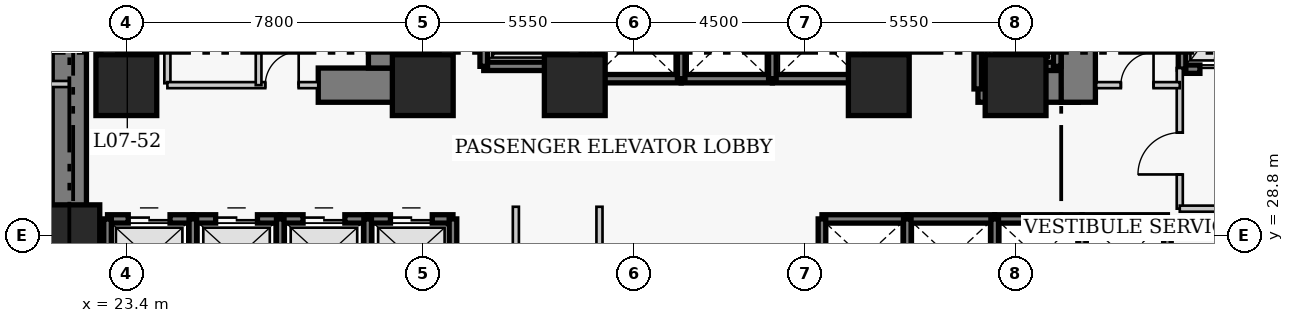
"""IFC4 building model, lengths in metres.
Left out: names, types, materials, properties, quantities, classifications, styles, units other than length and angle.
Written with IfcOpenShell. Run it as: python <this file> out.ifc"""

import sys

from ifc_helpers import new_model, si_unit, direction, frame, frame_2d, origin, origin_2d, place, context, subcontext, project, spatial, rectangle, extrude, element, fill, save


model = new_model("IFC4")
c1 = context("Model", 3, precision=1e-05, world=origin(), true_north=direction((0.0, 1.0)))
c2 = subcontext(c1, "Body", "Model", "MODEL_VIEW")
j1 = project(units=[si_unit("LENGTHUNIT", "METRE"), si_unit("PLANEANGLEUNIT", "RADIAN")], contexts=[c1])
p1 = place(None, origin())
s1 = spatial("IfcSite", under=j1, at=p1, CompositionType="ELEMENT")
p2 = place(p1, origin())
s2 = spatial("IfcBuilding", under=s1, at=p2, CompositionType="ELEMENT")
p3 = place(p2, frame((0.0, 0.0, 33.6)))
s3 = spatial("IfcBuildingStorey", under=s2, at=p3, CompositionType="ELEMENT", Elevation=33.6)
p4 = place(p3, frame((21.9, 27.05, 0.0), z_axis=(0.0, 0.0, 1.0), x_axis=(0.0, 1.0, 0.0)))
e1 = element("IfcWall", 1, at=p4, inside=s3, PredefinedType="SHEAR", context=c2, shape_type="SweptSolid", body=[
    extrude(rectangle(XDim=13.72, YDim=0.9, at=frame_2d((6.86, 0.0))), origin(), (0.0, 0.0, 1.0), 3.8),
])
p5 = place(p3, frame((28.45, 32.75, 0.0), z_axis=(0.0, 0.0, 1.0), x_axis=(1.0, 0.0, 0.0)))
e2 = element("IfcWall", 2, at=p5, inside=s3, PredefinedType="SHEAR", context=c2, shape_type="SweptSolid", body=[
    extrude(rectangle(XDim=2.4, YDim=0.9, at=frame_2d((1.2, 0.0))), origin(), (0.0, 0.0, 1.0), 3.8),
])
p6 = place(p3, frame((45.81, 32.75, 0.0), z_axis=(0.0, 0.0, 1.0), x_axis=(1.0, 0.0, 0.0)))
e3 = element("IfcWall", 3, at=p6, inside=s3, PredefinedType="SHEAR", context=c2, shape_type="SweptSolid", body=[
    extrude(rectangle(XDim=2.64, YDim=0.9, at=frame_2d((1.32, 0.0))), origin(), (0.0, 0.0, 1.0), 3.8),
])
p7 = place(p3, frame((30.22, 33.2, 0.0), z_axis=(0.0, 0.0, 1.0), x_axis=(0.0, 1.0, 0.0)))
e4 = element("IfcWall", 4, at=p7, inside=s3, PredefinedType="SHEAR", context=c2, shape_type="SweptSolid", body=[
    extrude(rectangle(XDim=7.12, YDim=0.9, at=frame_2d((3.56, 0.0))), origin(), (0.0, 0.0, 1.0), 3.8),
])
p8 = place(p3, frame((48.45, 32.3, 0.0), z_axis=(0.0, 0.0, 1.0), x_axis=(0.0, 1.0, 0.0)))
e5 = element("IfcWall", 5, at=p8, inside=s3, PredefinedType="SHEAR", context=c2, shape_type="SweptSolid", body=[
    extrude(rectangle(XDim=8.02, YDim=0.9, at=frame_2d((4.01, 0.0))), origin(), (0.0, 0.0, 1.0), 3.8),
])
p9 = place(p8, frame((5.9, 0.0, 0.0)))
e6 = element("IfcOpeningElement", 6, at=p9, cuts=e5, PredefinedType="OPENING", context=c2, shape_type="SweptSolid", body=[
    extrude(rectangle(XDim=1.1, YDim=2.15, at=frame_2d((0.55, 1.075))), frame((0.0, 0.46, 0.0), z_axis=(0.0, -1.0, 0.0), x_axis=(1.0, 0.0, 0.0)), (0.0, 0.0, 1.0), 0.92),
])
for number, where, z_axis, x_axis in (
    (7, (21.9, 28.8, 0.0), (0.0, 0.0, 1.0), (1.0, 0.0, 0.0)),
    (8, (23.4, 32.75, 0.0), (0.0, 0.0, 1.0), (1.0, 0.0, 0.0)),
    (9, (31.2, 32.75, 0.0), (0.0, 0.0, 1.0), (1.0, 0.0, 0.0)),
    (10, (35.2, 32.75, 0.0), (0.0, 0.0, 1.0), (1.0, 0.0, 0.0)),
    (11, (43.2, 32.75, 0.0), (0.0, 0.0, 1.0), (1.0, 0.0, 0.0)),
    (12, (46.8, 32.75, 0.0), (0.0, 0.0, 1.0), (1.0, 0.0, 0.0)),
):
    element("IfcColumn", number, at=place(p3, frame(where, z_axis=z_axis, x_axis=x_axis)), inside=s3, PredefinedType="COLUMN", context=c2, shape_type="SweptSolid", body=[
        extrude(rectangle(XDim=1.6, YDim=1.6, at=origin_2d()), origin(), (0.0, 0.0, 1.0), 3.8),
    ])
p10 = place(p3, frame((22.905, 29.23, 0.0), z_axis=(0.0, 0.0, 1.0), x_axis=(1.0, 0.0, 0.0)))
e13 = element("IfcWall", 13, at=p10, inside=s3, PredefinedType="SHEAR", context=c2, shape_type="SweptSolid", body=[
    extrude(rectangle(XDim=2.245, YDim=0.22, at=frame_2d((1.123, 0.0))), origin(), (0.0, 0.0, 1.0), 3.8),
])
p11 = place(p10, frame((0.545, 0.0, 0.0)))
e14 = element("IfcOpeningElement", 14, at=p11, cuts=e13, PredefinedType="OPENING", context=c2, shape_type="SweptSolid", body=[
    extrude(rectangle(XDim=1.1, YDim=2.15, at=frame_2d((0.55, 1.075))), frame((0.0, 0.12, 0.0), z_axis=(0.0, -1.0, 0.0), x_axis=(1.0, 0.0, 0.0)), (0.0, 0.0, 1.0), 0.24),
])
p12 = place(p3, frame((22.905, 27.17, 0.0), z_axis=(0.0, 0.0, 1.0), x_axis=(0.0, 1.0, 0.0)))
e15 = element("IfcWall", 15, at=p12, inside=s3, PredefinedType="SHEAR", context=c2, shape_type="SweptSolid", body=[
    extrude(rectangle(XDim=2.06, YDim=0.2, at=frame_2d((1.03, 0.0))), origin(), (0.0, 0.0, 1.0), 3.8),
])
p13 = place(p3, frame((25.15, 29.23, 0.0), z_axis=(0.0, 0.0, 1.0), x_axis=(1.0, 0.0, 0.0)))
e16 = element("IfcWall", 16, at=p13, inside=s3, PredefinedType="SHEAR", context=c2, shape_type="SweptSolid", body=[
    extrude(rectangle(XDim=2.3, YDim=0.22, at=frame_2d((1.15, 0.0))), origin(), (0.0, 0.0, 1.0), 3.8),
])
p14 = place(p13, frame((0.6, 0.0, 0.0)))
e17 = element("IfcOpeningElement", 17, at=p14, cuts=e16, PredefinedType="OPENING", context=c2, shape_type="SweptSolid", body=[
    extrude(rectangle(XDim=1.1, YDim=2.15, at=frame_2d((0.55, 1.075))), frame((0.0, 0.12, 0.0), z_axis=(0.0, -1.0, 0.0), x_axis=(1.0, 0.0, 0.0)), (0.0, 0.0, 1.0), 0.24),
])
p15 = place(p3, frame((25.15, 27.17, 0.0), z_axis=(0.0, 0.0, 1.0), x_axis=(0.0, 1.0, 0.0)))
e18 = element("IfcWall", 18, at=p15, inside=s3, PredefinedType="SHEAR", context=c2, shape_type="SweptSolid", body=[
    extrude(rectangle(XDim=2.06, YDim=0.2, at=frame_2d((1.03, 0.0))), origin(), (0.0, 0.0, 1.0), 3.8),
])
p16 = place(p3, frame((27.45, 29.23, 0.0), z_axis=(0.0, 0.0, 1.0), x_axis=(1.0, 0.0, 0.0)))
e19 = element("IfcWall", 19, at=p16, inside=s3, PredefinedType="SHEAR", context=c2, shape_type="SweptSolid", body=[
    extrude(rectangle(XDim=2.3, YDim=0.22, at=frame_2d((1.15, 0.0))), origin(), (0.0, 0.0, 1.0), 3.8),
])
p17 = place(p16, frame((0.6, 0.0, 0.0)))
e20 = element("IfcOpeningElement", 20, at=p17, cuts=e19, PredefinedType="OPENING", context=c2, shape_type="SweptSolid", body=[
    extrude(rectangle(XDim=1.1, YDim=2.15, at=frame_2d((0.55, 1.075))), frame((0.0, 0.12, 0.0), z_axis=(0.0, -1.0, 0.0), x_axis=(1.0, 0.0, 0.0)), (0.0, 0.0, 1.0), 0.24),
])
p18 = place(p3, frame((27.45, 27.17, 0.0), z_axis=(0.0, 0.0, 1.0), x_axis=(0.0, 1.0, 0.0)))
e21 = element("IfcWall", 21, at=p18, inside=s3, PredefinedType="SHEAR", context=c2, shape_type="SweptSolid", body=[
    extrude(rectangle(XDim=2.06, YDim=0.2, at=frame_2d((1.03, 0.0))), origin(), (0.0, 0.0, 1.0), 3.8),
])
p19 = place(p3, frame((29.75, 29.23, 0.0), z_axis=(0.0, 0.0, 1.0), x_axis=(1.0, 0.0, 0.0)))
e22 = element("IfcWall", 22, at=p19, inside=s3, PredefinedType="SHEAR", context=c2, shape_type="SweptSolid", body=[
    extrude(rectangle(XDim=2.245, YDim=0.22, at=frame_2d((1.123, 0.0))), origin(), (0.0, 0.0, 1.0), 3.8),
])
p20 = place(p19, frame((0.6, 0.0, 0.0)))
e23 = element("IfcOpeningElement", 23, at=p20, cuts=e22, PredefinedType="OPENING", context=c2, shape_type="SweptSolid", body=[
    extrude(rectangle(XDim=1.1, YDim=2.15, at=frame_2d((0.55, 1.075))), frame((0.0, 0.12, 0.0), z_axis=(0.0, -1.0, 0.0), x_axis=(1.0, 0.0, 0.0)), (0.0, 0.0, 1.0), 0.24),
])
for number, where, z_axis, x_axis in (
    (24, (29.75, 27.17, 0.0), (0.0, 0.0, 1.0), (0.0, 1.0, 0.0)),
    (25, (31.995, 27.17, 0.0), (0.0, 0.0, 1.0), (0.0, 1.0, 0.0)),
):
    element("IfcWall", number, at=place(p3, frame(where, z_axis=z_axis, x_axis=x_axis)), inside=s3, PredefinedType="SHEAR", context=c2, shape_type="SweptSolid", body=[
        extrude(rectangle(XDim=2.06, YDim=0.2, at=frame_2d((1.03, 0.0))), origin(), (0.0, 0.0, 1.0), 3.8),
    ])
p21 = place(p3, frame((41.705, 29.23, 0.0), z_axis=(0.0, 0.0, 1.0), x_axis=(1.0, 0.0, 0.0)))
e26 = element("IfcWall", 26, at=p21, inside=s3, PredefinedType="SHEAR", context=c2, shape_type="SweptSolid", body=[
    extrude(rectangle(XDim=2.245, YDim=0.22, at=frame_2d((1.123, 0.0))), origin(), (0.0, 0.0, 1.0), 3.8),
])
p22 = place(p3, frame((41.705, 27.17, 0.0), z_axis=(0.0, 0.0, 1.0), x_axis=(0.0, 1.0, 0.0)))
e27 = element("IfcWall", 27, at=p22, inside=s3, PredefinedType="SHEAR", context=c2, shape_type="SweptSolid", body=[
    extrude(rectangle(XDim=2.06, YDim=0.2, at=frame_2d((1.03, 0.0))), origin(), (0.0, 0.0, 1.0), 3.8),
])
p23 = place(p3, frame((43.95, 29.23, 0.0), z_axis=(0.0, 0.0, 1.0), x_axis=(1.0, 0.0, 0.0)))
e28 = element("IfcWall", 28, at=p23, inside=s3, PredefinedType="SHEAR", context=c2, shape_type="SweptSolid", body=[
    extrude(rectangle(XDim=2.3, YDim=0.22, at=frame_2d((1.15, 0.0))), origin(), (0.0, 0.0, 1.0), 3.8),
])
p24 = place(p3, frame((43.95, 27.17, 0.0), z_axis=(0.0, 0.0, 1.0), x_axis=(0.0, 1.0, 0.0)))
e29 = element("IfcWall", 29, at=p24, inside=s3, PredefinedType="SHEAR", context=c2, shape_type="SweptSolid", body=[
    extrude(rectangle(XDim=2.06, YDim=0.2, at=frame_2d((1.03, 0.0))), origin(), (0.0, 0.0, 1.0), 3.8),
])
p25 = place(p3, frame((46.25, 29.23, 0.0), z_axis=(0.0, 0.0, 1.0), x_axis=(1.0, 0.0, 0.0)))
e30 = element("IfcWall", 30, at=p25, inside=s3, PredefinedType="SHEAR", context=c2, shape_type="SweptSolid", body=[
    extrude(rectangle(XDim=2.3, YDim=0.22, at=frame_2d((1.15, 0.0))), origin(), (0.0, 0.0, 1.0), 3.8),
])
p26 = place(p3, frame((46.25, 27.17, 0.0), z_axis=(0.0, 0.0, 1.0), x_axis=(0.0, 1.0, 0.0)))
e31 = element("IfcWall", 31, at=p26, inside=s3, PredefinedType="SHEAR", context=c2, shape_type="SweptSolid", body=[
    extrude(rectangle(XDim=2.06, YDim=0.2, at=frame_2d((1.03, 0.0))), origin(), (0.0, 0.0, 1.0), 3.8),
])
p27 = place(p3, frame((48.55, 29.23, 0.0), z_axis=(0.0, 0.0, 1.0), x_axis=(1.0, 0.0, 0.0)))
e32 = element("IfcWall", 32, at=p27, inside=s3, PredefinedType="SHEAR", context=c2, shape_type="SweptSolid", body=[
    extrude(rectangle(XDim=2.245, YDim=0.22, at=frame_2d((1.123, 0.0))), origin(), (0.0, 0.0, 1.0), 3.8),
])
for number, where, z_axis, x_axis in (
    (33, (48.55, 27.17, 0.0), (0.0, 0.0, 1.0), (0.0, 1.0, 0.0)),
    (34, (50.795, 27.17, 0.0), (0.0, 0.0, 1.0), (0.0, 1.0, 0.0)),
):
    element("IfcWall", number, at=place(p3, frame(where, z_axis=z_axis, x_axis=x_axis)), inside=s3, PredefinedType="SHEAR", context=c2, shape_type="SweptSolid", body=[
        extrude(rectangle(XDim=2.06, YDim=0.2, at=frame_2d((1.03, 0.0))), origin(), (0.0, 0.0, 1.0), 3.8),
    ])
p28 = place(p3, frame((35.68, 32.92, 0.0), z_axis=(0.0, 0.0, 1.0), x_axis=(1.0, 0.0, 0.0)))
e35 = element("IfcWall", 35, at=p28, inside=s3, PredefinedType="SHEAR", context=c2, shape_type="SweptSolid", body=[
    extrude(rectangle(XDim=2.32, YDim=0.22, at=frame_2d((1.16, 0.0))), origin(), (0.0, 0.0, 1.0), 3.8),
])
p29 = place(p3, frame((35.68, 32.92, 0.0), z_axis=(0.0, 0.0, 1.0), x_axis=(0.0, 1.0, 0.0)))
e36 = element("IfcWall", 36, at=p29, inside=s3, PredefinedType="SHEAR", context=c2, shape_type="SweptSolid", body=[
    extrude(rectangle(XDim=2.16, YDim=0.2, at=frame_2d((1.08, 0.0))), origin(), (0.0, 0.0, 1.0), 3.8),
])
p30 = place(p3, frame((38.0, 32.92, 0.0), z_axis=(0.0, 0.0, 1.0), x_axis=(1.0, 0.0, 0.0)))
e37 = element("IfcWall", 37, at=p30, inside=s3, PredefinedType="SHEAR", context=c2, shape_type="SweptSolid", body=[
    extrude(rectangle(XDim=2.4, YDim=0.22, at=frame_2d((1.2, 0.0))), origin(), (0.0, 0.0, 1.0), 3.8),
])
p31 = place(p3, frame((38.0, 32.92, 0.0), z_axis=(0.0, 0.0, 1.0), x_axis=(0.0, 1.0, 0.0)))
e38 = element("IfcWall", 38, at=p31, inside=s3, PredefinedType="SHEAR", context=c2, shape_type="SweptSolid", body=[
    extrude(rectangle(XDim=2.16, YDim=0.2, at=frame_2d((1.08, 0.0))), origin(), (0.0, 0.0, 1.0), 3.8),
])
p32 = place(p3, frame((40.4, 32.92, 0.0), z_axis=(0.0, 0.0, 1.0), x_axis=(1.0, 0.0, 0.0)))
e39 = element("IfcWall", 39, at=p32, inside=s3, PredefinedType="SHEAR", context=c2, shape_type="SweptSolid", body=[
    extrude(rectangle(XDim=2.32, YDim=0.22, at=frame_2d((1.16, 0.0))), origin(), (0.0, 0.0, 1.0), 3.8),
])
for number, where, z_axis, x_axis in (
    (40, (40.4, 32.92, 0.0), (0.0, 0.0, 1.0), (0.0, 1.0, 0.0)),
    (41, (42.72, 32.92, 0.0), (0.0, 0.0, 1.0), (0.0, 1.0, 0.0)),
):
    element("IfcWall", number, at=place(p3, frame(where, z_axis=z_axis, x_axis=x_axis)), inside=s3, PredefinedType="SHEAR", context=c2, shape_type="SweptSolid", body=[
        extrude(rectangle(XDim=2.16, YDim=0.2, at=frame_2d((1.08, 0.0))), origin(), (0.0, 0.0, 1.0), 3.8),
    ])
p33 = place(p3, frame((51.18, 33.17, 0.0), z_axis=(0.0, 0.0, 1.0), x_axis=(1.0, 0.0, 0.0)))
e42 = element("IfcWall", 42, at=p33, inside=s3, PredefinedType="SHEAR", context=c2, shape_type="SweptSolid", body=[
    extrude(rectangle(XDim=2.42, YDim=0.22, at=frame_2d((1.21, 0.0))), origin(), (0.0, 0.0, 1.0), 3.8),
])
p34 = place(p33, frame((0.47, 0.0, 0.0)))
e43 = element("IfcOpeningElement", 43, at=p34, cuts=e42, PredefinedType="OPENING", context=c2, shape_type="SweptSolid", body=[
    extrude(rectangle(XDim=1.3, YDim=2.15, at=frame_2d((0.65, 1.075))), frame((0.0, 0.12, 0.0), z_axis=(0.0, -1.0, 0.0), x_axis=(1.0, 0.0, 0.0)), (0.0, 0.0, 1.0), 0.24),
])
p35 = place(p3, frame((51.18, 33.17, 0.0), z_axis=(0.0, 0.0, 1.0), x_axis=(0.0, 1.0, 0.0)))
e44 = element("IfcWall", 44, at=p35, inside=s3, PredefinedType="SHEAR", context=c2, shape_type="SweptSolid", body=[
    extrude(rectangle(XDim=2.86, YDim=0.2, at=frame_2d((1.43, 0.0))), origin(), (0.0, 0.0, 1.0), 3.8),
])
p36 = place(p3, frame((32.805, 33.245, 0.0), z_axis=(0.0, 0.0, 1.0), x_axis=(1.0, 0.0, 0.0)))
e45 = element("IfcWall", 45, at=p36, inside=s3, PredefinedType="SHEAR", context=c2, shape_type="SweptSolid", body=[
    extrude(rectangle(XDim=2.09, YDim=0.22, at=frame_2d((1.045, 0.0))), origin(), (0.0, 0.0, 1.0), 3.8),
])
for number, where, z_axis, x_axis in (
    (46, (32.805, 33.245, 0.0), (0.0, 0.0, 1.0), (0.0, 1.0, 0.0)),
    (47, (34.895, 33.245, 0.0), (0.0, 0.0, 1.0), (0.0, 1.0, 0.0)),
):
    element("IfcWall", number, at=place(p3, frame(where, z_axis=z_axis, x_axis=x_axis)), inside=s3, PredefinedType="SHEAR", context=c2, shape_type="SweptSolid", body=[
        extrude(rectangle(XDim=2.91, YDim=0.2, at=frame_2d((1.455, 0.0))), origin(), (0.0, 0.0, 1.0), 3.8),
    ])
p37 = place(p3, frame((45.805, 33.245, 0.0), z_axis=(0.0, 0.0, 1.0), x_axis=(1.0, 0.0, 0.0)))
e48 = element("IfcWall", 48, at=p37, inside=s3, PredefinedType="SHEAR", context=c2, shape_type="SweptSolid", body=[
    extrude(rectangle(XDim=2.09, YDim=0.22, at=frame_2d((1.045, 0.0))), origin(), (0.0, 0.0, 1.0), 3.8),
])
p38 = place(p3, frame((45.805, 32.65, 0.0), z_axis=(0.0, 0.0, 1.0), x_axis=(0.0, 1.0, 0.0)))
e49 = element("IfcWall", 49, at=p38, inside=s3, PredefinedType="SHEAR", context=c2, shape_type="SweptSolid", body=[
    extrude(rectangle(XDim=3.505, YDim=0.2, at=frame_2d((1.752, 0.0))), origin(), (0.0, 0.0, 1.0), 3.8),
])
p39 = place(p3, frame((47.895, 33.245, 0.0), z_axis=(0.0, 0.0, 1.0), x_axis=(0.0, 1.0, 0.0)))
e50 = element("IfcWall", 50, at=p39, inside=s3, PredefinedType="SHEAR", context=c2, shape_type="SweptSolid", body=[
    extrude(rectangle(XDim=2.91, YDim=0.2, at=frame_2d((1.455, 0.0))), origin(), (0.0, 0.0, 1.0), 3.8),
])
p40 = place(p3, frame((24.48, 32.8, 0.0), z_axis=(0.0, 0.0, 1.0), x_axis=(0.0, 1.0, 0.0)))
e51 = element("IfcWall", 51, at=p40, inside=s3, PredefinedType="PARTITIONING", context=c2, shape_type="SweptSolid", body=[
    extrude(rectangle(XDim=3.57, YDim=0.16, at=frame_2d((1.785, 0.0))), origin(), (0.0, 0.0, 1.0), 3.54),
])
p41 = place(p40, frame((1.604, 0.0, 0.0)))
e52 = element("IfcOpeningElement", 52, at=p41, cuts=e51, PredefinedType="OPENING", context=c2, shape_type="SweptSolid", body=[
    extrude(rectangle(XDim=0.9, YDim=2.1, at=frame_2d((0.45, 1.05))), frame((0.0, 0.09, 0.0), z_axis=(0.0, -1.0, 0.0), x_axis=(1.0, 0.0, 0.0)), (0.0, 0.0, 1.0), 0.18),
])
p42 = place(p3, frame((51.12, 29.5, 0.0), z_axis=(0.0, 0.0, 1.0), x_axis=(0.0, 1.0, 0.0)))
e53 = element("IfcWall", 53, at=p42, inside=s3, PredefinedType="PARTITIONING", context=c2, shape_type="SweptSolid", body=[
    extrude(rectangle(XDim=3.7, YDim=0.16, at=frame_2d((1.85, 0.0))), origin(), (0.0, 0.0, 1.0), 3.54),
])
p43 = place(p42, frame((0.9, 0.0, 0.0)))
e54 = element("IfcOpeningElement", 54, at=p43, cuts=e53, PredefinedType="OPENING", context=c2, shape_type="SweptSolid", body=[
    extrude(rectangle(XDim=1.1, YDim=2.15, at=frame_2d((0.55, 1.075))), frame((0.0, 0.09, 0.0), z_axis=(0.0, -1.0, 0.0), x_axis=(1.0, 0.0, 0.0)), (0.0, 0.0, 1.0), 0.18),
])
p44 = place(p3, frame((51.12, 29.5, 0.0), z_axis=(0.0, 0.0, 1.0), x_axis=(1.0, 0.0, 0.0)))
e55 = element("IfcWall", 55, at=p44, inside=s3, PredefinedType="PARTITIONING", context=c2, shape_type="SweptSolid", body=[
    extrude(rectangle(XDim=5.63, YDim=0.16, at=frame_2d((2.815, 0.0))), origin(), (0.0, 0.0, 1.0), 3.54),
])
p45 = place(p3, frame((24.48, 32.75, 0.0), z_axis=(0.0, 0.0, 1.0), x_axis=(1.0, 0.0, 0.0)))
e56 = element("IfcWall", 56, at=p45, inside=s3, PredefinedType="PARTITIONING", context=c2, shape_type="SweptSolid", body=[
    extrude(rectangle(XDim=3.97, YDim=0.16, at=frame_2d((1.985, 0.0))), origin(), (0.0, 0.0, 1.0), 3.54),
])
p46 = place(p45, frame((2.575, 0.0, 0.0)))
e57 = element("IfcOpeningElement", 57, at=p46, cuts=e56, PredefinedType="OPENING", context=c2, shape_type="SweptSolid", body=[
    extrude(rectangle(XDim=0.88, YDim=2.05, at=frame_2d((0.44, 1.025))), frame((0.0, 0.09, 0.0), z_axis=(0.0, -1.0, 0.0), x_axis=(1.0, 0.0, 0.0)), (0.0, 0.0, 1.0), 0.18),
])
p47 = place(p3, frame((48.92, 32.75, 0.0), z_axis=(0.0, 0.0, 1.0), x_axis=(1.0, 0.0, 0.0)))
e58 = element("IfcWall", 58, at=p47, inside=s3, PredefinedType="PARTITIONING", context=c2, shape_type="SweptSolid", body=[
    extrude(rectangle(XDim=2.2, YDim=0.16, at=frame_2d((1.1, 0.0))), origin(), (0.0, 0.0, 1.0), 3.54),
])
p48 = place(p47, frame((0.65, 0.0, 0.0)))
e59 = element("IfcOpeningElement", 59, at=p48, cuts=e58, PredefinedType="OPENING", context=c2, shape_type="SweptSolid", body=[
    extrude(rectangle(XDim=0.86, YDim=2.05, at=frame_2d((0.43, 1.025))), frame((0.0, 0.09, 0.0), z_axis=(0.0, -1.0, 0.0), x_axis=(1.0, 0.0, 0.0)), (0.0, 0.0, 1.0), 0.18),
])
p49 = place(p3, frame((26.88, 32.75, 0.0), z_axis=(0.0, 0.0, 1.0), x_axis=(0.0, 1.0, 0.0)))
e60 = element("IfcWall", 60, at=p49, inside=s3, PredefinedType="PARTITIONING", context=c2, shape_type="SweptSolid", body=[
    extrude(rectangle(XDim=3.62, YDim=0.15, at=frame_2d((1.81, 0.0))), origin(), (0.0, 0.0, 1.0), 3.54),
])
for number, where, z_axis, x_axis in (
    (61, (33.65, 24.71, 0.0), (0.0, 0.0, 1.0), (0.0, 1.0, 0.0)),
    (62, (35.85, 24.71, 0.0), (0.0, 0.0, 1.0), (0.0, 1.0, 0.0)),
):
    element("IfcWall", number, at=place(p3, frame(where, z_axis=z_axis, x_axis=x_axis)), inside=s3, PredefinedType="PARTITIONING", context=c2, shape_type="SweptSolid", body=[
        extrude(rectangle(XDim=4.84, YDim=0.16, at=frame_2d((2.42, 0.0))), origin(), (0.0, 0.0, 1.0), 3.54),
    ])
p50 = place(p3, frame((18.86, 32.78, 0.0), z_axis=(0.0, 0.0, 1.0), x_axis=(1.0, 0.0, 0.0)))
e63 = element("IfcWall", 63, at=p50, inside=s3, PredefinedType="PARTITIONING", context=c2, shape_type="SweptSolid", body=[
    extrude(rectangle(XDim=3.04, YDim=0.16, at=frame_2d((1.52, 0.0))), origin(), (0.0, 0.0, 1.0), 3.54),
])
p51 = place(p11, origin())
e64 = element("IfcDoor", 64, at=p51, inside=s3, OperationType="DOUBLE_DOOR_SLIDING", PredefinedType="DOOR", context=c2, shape_type="SweptSolid", body=[
    extrude(rectangle(XDim=1.1, YDim=2.15, at=frame_2d((0.55, 1.075))), frame((0.0, 0.025, 0.0), z_axis=(0.0, -1.0, 0.0), x_axis=(1.0, 0.0, 0.0)), (0.0, 0.0, 1.0), 0.05),
])
fill(e14, e64)
p52 = place(p14, origin())
e65 = element("IfcDoor", 65, at=p52, inside=s3, OperationType="DOUBLE_DOOR_SLIDING", PredefinedType="DOOR", context=c2, shape_type="SweptSolid", body=[
    extrude(rectangle(XDim=1.1, YDim=2.15, at=frame_2d((0.55, 1.075))), frame((0.0, 0.025, 0.0), z_axis=(0.0, -1.0, 0.0), x_axis=(1.0, 0.0, 0.0)), (0.0, 0.0, 1.0), 0.05),
])
fill(e17, e65)
p53 = place(p17, origin())
e66 = element("IfcDoor", 66, at=p53, inside=s3, OperationType="DOUBLE_DOOR_SLIDING", PredefinedType="DOOR", context=c2, shape_type="SweptSolid", body=[
    extrude(rectangle(XDim=1.1, YDim=2.15, at=frame_2d((0.55, 1.075))), frame((0.0, 0.025, 0.0), z_axis=(0.0, -1.0, 0.0), x_axis=(1.0, 0.0, 0.0)), (0.0, 0.0, 1.0), 0.05),
])
fill(e20, e66)
p54 = place(p20, origin())
e67 = element("IfcDoor", 67, at=p54, inside=s3, OperationType="DOUBLE_DOOR_SLIDING", PredefinedType="DOOR", context=c2, shape_type="SweptSolid", body=[
    extrude(rectangle(XDim=1.1, YDim=2.15, at=frame_2d((0.55, 1.075))), frame((0.0, 0.025, 0.0), z_axis=(0.0, -1.0, 0.0), x_axis=(1.0, 0.0, 0.0)), (0.0, 0.0, 1.0), 0.05),
])
fill(e23, e67)
p55 = place(p34, origin())
e68 = element("IfcDoor", 68, at=p55, inside=s3, OperationType="DOUBLE_DOOR_SLIDING", PredefinedType="DOOR", context=c2, shape_type="SweptSolid", body=[
    extrude(rectangle(XDim=1.3, YDim=2.15, at=frame_2d((0.65, 1.075))), frame((0.0, 0.025, 0.0), z_axis=(0.0, -1.0, 0.0), x_axis=(1.0, 0.0, 0.0)), (0.0, 0.0, 1.0), 0.05),
])
fill(e43, e68)
p56 = place(p43, origin())
e69 = element("IfcDoor", 69, at=p56, inside=s3, OperationType="SINGLE_SWING_LEFT", PredefinedType="DOOR", context=c2, shape_type="SweptSolid", body=[
    extrude(rectangle(XDim=1.1, YDim=2.15, at=frame_2d((0.55, 1.075))), frame((0.0, 0.025, 0.0), z_axis=(0.0, -1.0, 0.0), x_axis=(1.0, 0.0, 0.0)), (0.0, 0.0, 1.0), 0.05),
])
fill(e54, e69)
p57 = place(p46, origin())
e70 = element("IfcDoor", 70, at=p57, inside=s3, OperationType="SINGLE_SWING_RIGHT", PredefinedType="DOOR", context=c2, shape_type="SweptSolid", body=[
    extrude(rectangle(XDim=0.88, YDim=2.05, at=frame_2d((0.44, 1.025))), frame((0.0, 0.025, 0.0), z_axis=(0.0, -1.0, 0.0), x_axis=(1.0, 0.0, 0.0)), (0.0, 0.0, 1.0), 0.05),
])
fill(e57, e70)
p58 = place(p48, origin())
e71 = element("IfcDoor", 71, at=p58, inside=s3, OperationType="SINGLE_SWING_RIGHT", PredefinedType="DOOR", context=c2, shape_type="SweptSolid", body=[
    extrude(rectangle(XDim=0.86, YDim=2.05, at=frame_2d((0.43, 1.025))), frame((0.0, 0.025, 0.0), z_axis=(0.0, -1.0, 0.0), x_axis=(1.0, 0.0, 0.0)), (0.0, 0.0, 1.0), 0.05),
])
fill(e59, e71)
save(model, sys.argv[1])
